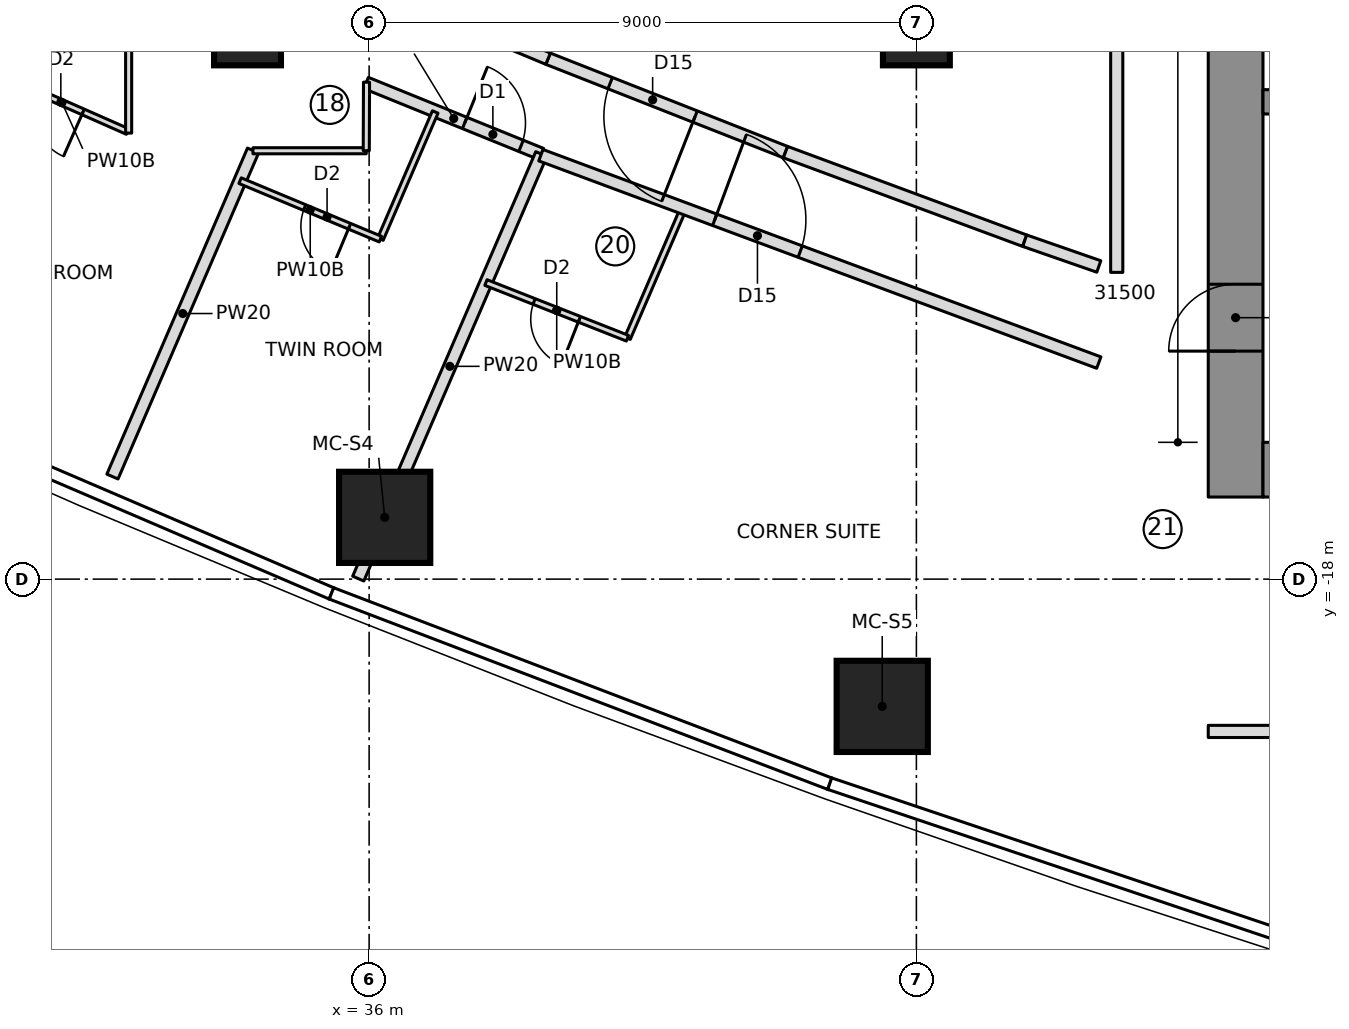
"""IFC4 building model, lengths in metres.
Left out: names, types, materials, properties, quantities, classifications, styles, units other than length and angle.
Written with IfcOpenShell. Run it as: python <this file> out.ifc"""

import sys

from ifc_helpers import new_model, si_unit, direction, frame, frame_2d, origin, origin_2d, place, context, subcontext, project, spatial, rectangle, extrude, element, fill, save


model = new_model("IFC4")
c1 = context("Model", 3, precision=1e-05, world=origin(), true_north=direction((0.0, 1.0)))
c2 = subcontext(c1, "Body", "Model", "MODEL_VIEW")
j1 = project(units=[si_unit("LENGTHUNIT", "METRE"), si_unit("PLANEANGLEUNIT", "RADIAN")], contexts=[c1])
p1 = place(None, origin())
s1 = spatial("IfcSite", under=j1, at=p1, CompositionType="ELEMENT")
p2 = place(p1, origin())
s2 = spatial("IfcBuilding", under=s1, at=p2, CompositionType="ELEMENT")
p3 = place(p2, frame((0.0, 0.0, 147.95)))
s3 = spatial("IfcBuildingStorey", under=s2, at=p3, CompositionType="ELEMENT", Elevation=147.95)
p4 = place(p3, frame((50.25, -16.65, 0.0), z_axis=(0.0, 0.0, 1.0), x_axis=(0.0, 1.0, 0.0)))
e1 = element("IfcWall", 1, at=p4, inside=s3, PredefinedType="SHEAR", context=c2, shape_type="SweptSolid", body=[
    extrude(rectangle(XDim=10.0, YDim=0.9, at=frame_2d((5.0, 0.0))), origin(), (0.0, 0.0, 1.0), 3.55),
])
p5 = place(p4, frame((2.4, 0.0, 0.0)))
e2 = element("IfcOpeningElement", 2, at=p5, cuts=e1, PredefinedType="OPENING", context=c2, shape_type="SweptSolid", body=[
    extrude(rectangle(XDim=1.1, YDim=2.1, at=frame_2d((0.55, 1.05))), frame((0.0, 0.46, 0.0), z_axis=(0.0, -1.0, 0.0), x_axis=(1.0, 0.0, 0.0)), (0.0, 0.0, 1.0), 0.92),
])
p6 = place(p3, frame((50.7, -16.2, 0.0), z_axis=(0.0, 0.0, 1.0), x_axis=(1.0, 0.0, 0.0)))
e3 = element("IfcWall", 3, at=p6, inside=s3, PredefinedType="SHEAR", context=c2, shape_type="SweptSolid", body=[
    extrude(rectangle(XDim=13.92, YDim=0.9, at=frame_2d((6.96, 0.0))), origin(), (0.0, 0.0, 1.0), 3.55),
])
p7 = place(p3, frame((50.7, -10.15, 0.0), z_axis=(0.0, 0.0, 1.0), x_axis=(1.0, 0.0, 0.0)))
e4 = element("IfcWall", 4, at=p7, inside=s3, PredefinedType="SHEAR", context=c2, shape_type="SweptSolid", body=[
    extrude(rectangle(XDim=13.02, YDim=0.4, at=frame_2d((6.51, 0.0))), origin(), (0.0, 0.0, 1.0), 3.55),
])
for number, where, z_axis, x_axis in (
    (5, (36.256, -16.984, 0.0), (0.0, 0.0, 1.0), (1.0, 0.0, 0.0)),
    (6, (44.438, -20.093, 0.0), (0.0, 0.0, 1.0), (1.0, 0.0, 0.0)),
):
    element("IfcColumn", number, at=place(p3, frame(where, z_axis=z_axis, x_axis=x_axis)), inside=s3, PredefinedType="COLUMN", context=c2, shape_type="SweptSolid", body=[
        extrude(rectangle(XDim=1.5, YDim=1.5, at=origin_2d()), origin(), (0.0, 0.0, 1.0), 3.55),
    ])
for number, where, z_axis, x_axis in (
    (7, (34.0, -9.0, 0.0), (0.0, 0.0, 1.0), (1.0, 0.0, 0.0)),
    (8, (45.0, -9.0, 0.0), (0.0, 0.0, 1.0), (1.0, 0.0, 0.0)),
):
    element("IfcColumn", number, at=place(p3, frame(where, z_axis=z_axis, x_axis=x_axis)), inside=s3, PredefinedType="COLUMN", context=c2, shape_type="SweptSolid", body=[
        extrude(rectangle(XDim=1.1, YDim=1.1, at=origin_2d()), origin(), (0.0, 0.0, 1.0), 3.55),
    ])
p8 = place(p3, frame((27.771, -14.554, 0.0), z_axis=(0.0, 0.0, 1.0), x_axis=(0.396004020147, 0.918248776763, 0.0)))
e9 = element("IfcWall", 9, at=p8, inside=s3, PredefinedType="PARTITIONING", context=c2, shape_type="SweptSolid", body=[
    extrude(rectangle(XDim=7.6, YDim=0.2, at=frame_2d((3.8, 0.0))), origin(), (0.0, 0.0, 1.0), 3.25),
])
p9 = place(p3, frame((32.028, -10.638, 0.0), z_axis=(0.0, 0.0, 1.0), x_axis=(-0.915108845766, 0.403206895278, 0.0)))
e10 = element("IfcWall", 10, at=p9, inside=s3, PredefinedType="PARTITIONING", context=c2, shape_type="SweptSolid", body=[
    extrude(rectangle(XDim=2.358, YDim=0.1, at=frame_2d((1.179, 0.0))), origin(), (0.0, 0.0, 1.0), 3.25),
])
p10 = place(p9, frame((0.8, 0.0, 0.0)))
e11 = element("IfcOpeningElement", 11, at=p10, cuts=e10, PredefinedType="OPENING", context=c2, shape_type="SweptSolid", body=[
    extrude(rectangle(XDim=0.8, YDim=2.1, at=frame_2d((0.4, 1.05))), frame((0.0, 0.06, 0.0), z_axis=(0.0, -1.0, 0.0), x_axis=(1.0, 0.0, 0.0)), (0.0, 0.0, 1.0), 0.12),
])
p11 = place(p3, frame((31.779, -16.313, 0.0), z_axis=(0.0, 0.0, 1.0), x_axis=(0.395991607501, 0.918254129742, 0.0)))
e12 = element("IfcWall", 12, at=p11, inside=s3, PredefinedType="PARTITIONING", context=c2, shape_type="SweptSolid", body=[
    extrude(rectangle(XDim=5.841, YDim=0.2, at=frame_2d((2.92, 0.0))), origin(), (0.0, 0.0, 1.0), 3.25),
])
p12 = place(p3, frame((35.95, -9.84, 0.0), z_axis=(0.0, 0.0, 1.0), x_axis=(0.926663171188, -0.375892760191, 0.0)))
e13 = element("IfcWall", 13, at=p12, inside=s3, PredefinedType="PARTITIONING", context=c2, shape_type="SweptSolid", body=[
    extrude(rectangle(XDim=3.11, YDim=0.2, at=frame_2d((1.555, 0.0))), origin(), (0.0, 0.0, 1.0), 3.25),
])
p13 = place(p12, frame((1.75, 0.0, 0.0)))
e14 = element("IfcOpeningElement", 14, at=p13, cuts=e13, PredefinedType="OPENING", context=c2, shape_type="SweptSolid", body=[
    extrude(rectangle(XDim=1.0, YDim=2.1, at=frame_2d((0.5, 1.05))), frame((0.0, 0.11, 0.0), z_axis=(0.0, -1.0, 0.0), x_axis=(1.0, 0.0, 0.0)), (0.0, 0.0, 1.0), 0.22),
])
p14 = place(p3, frame((37.087, -10.317, 0.0), z_axis=(0.0, 0.0, 1.0), x_axis=(-0.395936907069, -0.918277717045, 0.0)))
e15 = element("IfcWall", 15, at=p14, inside=s3, PredefinedType="PARTITIONING", context=c2, shape_type="SweptSolid", body=[
    extrude(rectangle(XDim=2.277, YDim=0.1, at=frame_2d((1.139, 0.0))), origin(), (0.0, 0.0, 1.0), 3.25),
])
p15 = place(p3, frame((36.185, -12.408, 0.0), z_axis=(0.0, 0.0, 1.0), x_axis=(-0.923033583854, 0.384719382248, 0.0)))
e16 = element("IfcWall", 16, at=p15, inside=s3, PredefinedType="PARTITIONING", context=c2, shape_type="SweptSolid", body=[
    extrude(rectangle(XDim=2.5, YDim=0.1, at=frame_2d((1.25, 0.0))), origin(), (0.0, 0.0, 1.0), 3.25),
])
p16 = place(p15, frame((0.55, 0.0, 0.0)))
e17 = element("IfcOpeningElement", 17, at=p16, cuts=e16, PredefinedType="OPENING", context=c2, shape_type="SweptSolid", body=[
    extrude(rectangle(XDim=0.8, YDim=2.1, at=frame_2d((0.4, 1.05))), frame((0.0, 0.06, 0.0), z_axis=(0.0, -1.0, 0.0), x_axis=(1.0, 0.0, 0.0)), (0.0, 0.0, 1.0), 0.12),
])
p17 = place(p3, frame((35.821, -17.991, 0.0), z_axis=(0.0, 0.0, 1.0), x_axis=(0.395987603644, 0.918255856371, 0.0)))
e18 = element("IfcWall", 18, at=p17, inside=s3, PredefinedType="PARTITIONING", context=c2, shape_type="SweptSolid", body=[
    extrude(rectangle(XDim=7.604, YDim=0.2, at=frame_2d((3.802, 0.0))), origin(), (0.0, 0.0, 1.0), 3.25),
])
p18 = place(p3, frame((41.151, -11.946, 0.0), z_axis=(0.0, 0.0, 1.0), x_axis=(-0.39596178423, -0.918266990275, 0.0)))
e19 = element("IfcWall", 19, at=p18, inside=s3, PredefinedType="PARTITIONING", context=c2, shape_type="SweptSolid", body=[
    extrude(rectangle(XDim=2.278, YDim=0.1, at=frame_2d((1.139, 0.0))), origin(), (0.0, 0.0, 1.0), 3.25),
])
p19 = place(p3, frame((40.249, -14.038, 0.0), z_axis=(0.0, 0.0, 1.0), x_axis=(-0.930555592459, 0.366150637503, 0.0)))
e20 = element("IfcWall", 20, at=p19, inside=s3, PredefinedType="PARTITIONING", context=c2, shape_type="SweptSolid", body=[
    extrude(rectangle(XDim=2.501, YDim=0.1, at=frame_2d((1.25, 0.0))), origin(), (0.0, 0.0, 1.0), 3.25),
])
p20 = place(p19, frame((0.85, 0.0, 0.0)))
e21 = element("IfcOpeningElement", 21, at=p20, cuts=e20, PredefinedType="OPENING", context=c2, shape_type="SweptSolid", body=[
    extrude(rectangle(XDim=0.8, YDim=2.1, at=frame_2d((0.4, 1.05))), frame((0.0, 0.06, 0.0), z_axis=(0.0, -1.0, 0.0), x_axis=(1.0, 0.0, 0.0)), (0.0, 0.0, 1.0), 0.12),
])
p21 = place(p3, frame((42.847, -10.977, 0.0), z_axis=(0.0, 0.0, 1.0), x_axis=(-0.930576677263, 0.36609704688, 0.0)))
e22 = element("IfcWall", 22, at=p21, inside=s3, PredefinedType="PARTITIONING", context=c2, shape_type="SweptSolid", body=[
    extrude(rectangle(XDim=4.195, YDim=0.2, at=frame_2d((2.098, 0.0))), origin(), (0.0, 0.0, 1.0), 3.25),
])
p22 = place(p21, frame((1.598, 0.0, 0.0)))
e23 = element("IfcOpeningElement", 23, at=p22, cuts=e22, PredefinedType="OPENING", context=c2, shape_type="SweptSolid", body=[
    extrude(rectangle(XDim=1.5, YDim=2.1, at=frame_2d((0.75, 1.05))), frame((0.0, 0.11, 0.0), z_axis=(0.0, -1.0, 0.0), x_axis=(1.0, 0.0, 0.0)), (0.0, 0.0, 1.0), 0.22),
])
p23 = place(p3, frame((46.781, -12.434, 0.0), z_axis=(0.0, 0.0, 1.0), x_axis=(-0.937732614305, 0.347357948044, 0.0)))
e24 = element("IfcWall", 24, at=p23, inside=s3, PredefinedType="PARTITIONING", context=c2, shape_type="SweptSolid", body=[
    extrude(rectangle(XDim=4.195, YDim=0.2, at=frame_2d((2.098, 0.0))), origin(), (0.0, 0.0, 1.0), 3.25),
])
p24 = place(p3, frame((38.943, -9.441, 0.0), z_axis=(0.0, 0.0, 1.0), x_axis=(-0.923008963065, 0.384778448073, 0.0)))
e25 = element("IfcWall", 25, at=p24, inside=s3, PredefinedType="PARTITIONING", context=c2, shape_type="SweptSolid", body=[
    extrude(rectangle(XDim=2.339, YDim=0.2, at=frame_2d((1.169, 0.0))), origin(), (0.0, 0.0, 1.0), 3.25),
])
p25 = place(p3, frame((49.8, -20.505, 0.0), z_axis=(0.0, 0.0, 1.0), x_axis=(1.0, 0.0, 0.0)))
e26 = element("IfcWall", 26, at=p25, inside=s3, PredefinedType="PARTITIONING", context=c2, shape_type="SweptSolid", body=[
    extrude(rectangle(XDim=12.133, YDim=0.2, at=frame_2d((6.066, 0.0))), origin(), (0.0, 0.0, 1.0), 3.25),
])
p26 = place(p25, frame((5.566, 0.0, 0.0)))
e27 = element("IfcOpeningElement", 27, at=p26, cuts=e26, PredefinedType="OPENING", context=c2, shape_type="SweptSolid", body=[
    extrude(rectangle(XDim=1.5, YDim=2.1, at=frame_2d((0.75, 1.05))), frame((0.0, 0.11, 0.0), z_axis=(0.0, -1.0, 0.0), x_axis=(1.0, 0.0, 0.0)), (0.0, 0.0, 1.0), 0.22),
])
p27 = place(p3, frame((32.045, -8.238, 0.0), z_axis=(0.0, 0.0, 1.0), x_axis=(0.0, -1.0, 0.0)))
e28 = element("IfcWall", 28, at=p27, inside=s3, PredefinedType="PARTITIONING", context=c2, shape_type="SweptSolid", body=[
    extrude(rectangle(XDim=2.426, YDim=0.1, at=frame_2d((1.213, 0.0))), origin(), (0.0, 0.0, 1.0), 3.25),
])
p28 = place(p3, frame((34.089, -10.955, 0.0), z_axis=(0.0, 0.0, 1.0), x_axis=(0.999999862691, 0.000524040279, 0.0)))
e29 = element("IfcWall", 29, at=p28, inside=s3, PredefinedType="PARTITIONING", context=c2, shape_type="SweptSolid", body=[
    extrude(rectangle(XDim=1.864, YDim=0.1, at=frame_2d((0.932, 0.0))), origin(), (0.0, 0.0, 1.0), 3.25),
])
p29 = place(p3, frame((35.953, -10.954, 0.0), z_axis=(0.0, 0.0, 1.0), x_axis=(0.00368122235, 0.999993224278, 0.0)))
e30 = element("IfcWall", 30, at=p29, inside=s3, PredefinedType="PARTITIONING", context=c2, shape_type="SweptSolid", body=[
    extrude(rectangle(XDim=1.127, YDim=0.1, at=frame_2d((0.564, 0.0))), origin(), (0.0, 0.0, 1.0), 3.25),
])
p30 = place(p3, frame((38.824, -11.028, 0.0), z_axis=(0.0, 0.0, 1.0), x_axis=(0.937322662166, -0.348462662262, 0.0)))
e31 = element("IfcWall", 31, at=p30, inside=s3, PredefinedType="PARTITIONING", context=c2, shape_type="SweptSolid", body=[
    extrude(rectangle(XDim=9.789, YDim=0.2, at=frame_2d((4.895, 0.0))), origin(), (0.0, 0.0, 1.0), 3.25),
])
p31 = place(p30, frame((3.05, 0.0, 0.0)))
e32 = element("IfcOpeningElement", 32, at=p31, cuts=e31, PredefinedType="OPENING", context=c2, shape_type="SweptSolid", body=[
    extrude(rectangle(XDim=1.5, YDim=2.1, at=frame_2d((0.75, 1.05))), frame((0.0, 0.11, 0.0), z_axis=(0.0, -1.0, 0.0), x_axis=(1.0, 0.0, 0.0)), (0.0, 0.0, 1.0), 0.22),
])
p32 = place(p3, frame((48.0, -12.858, 0.0), z_axis=(0.0, 0.0, 1.0), x_axis=(-0.944517215109, 0.328461916152, 0.0)))
e33 = element("IfcWall", 33, at=p32, inside=s3, PredefinedType="PARTITIONING", context=c2, shape_type="SweptSolid", body=[
    extrude(rectangle(XDim=1.29, YDim=0.2, at=frame_2d((0.645, 0.0))), origin(), (0.0, 0.0, 1.0), 3.25),
])
p33 = place(p3, frame((48.295, 12.955, 0.0), z_axis=(0.0, 0.0, 1.0), x_axis=(0.0, -1.0, 0.0)))
e34 = element("IfcWall", 34, at=p33, inside=s3, PredefinedType="PARTITIONING", context=c2, shape_type="SweptSolid", body=[
    extrude(rectangle(XDim=25.91, YDim=0.2, at=frame_2d((12.955, 0.0))), origin(), (0.0, 0.0, 1.0), 3.25),
])
p34 = place(p10, origin())
e35 = element("IfcDoor", 35, at=p34, inside=s3, OperationType="SINGLE_SWING_LEFT", PredefinedType="DOOR", context=c2, shape_type="SweptSolid", body=[
    extrude(rectangle(XDim=0.8, YDim=2.1, at=frame_2d((0.4, 1.05))), frame((0.0, 0.025, 0.0), z_axis=(0.0, -1.0, 0.0), x_axis=(1.0, 0.0, 0.0)), (0.0, 0.0, 1.0), 0.05),
])
fill(e11, e35)
p35 = place(p16, origin())
e36 = element("IfcDoor", 36, at=p35, inside=s3, OperationType="SINGLE_SWING_LEFT", PredefinedType="DOOR", context=c2, shape_type="SweptSolid", body=[
    extrude(rectangle(XDim=0.8, YDim=2.1, at=frame_2d((0.4, 1.05))), frame((0.0, 0.025, 0.0), z_axis=(0.0, -1.0, 0.0), x_axis=(1.0, 0.0, 0.0)), (0.0, 0.0, 1.0), 0.05),
])
fill(e17, e36)
p36 = place(p13, origin())
e37 = element("IfcDoor", 37, at=p36, inside=s3, OperationType="SINGLE_SWING_LEFT", PredefinedType="DOOR", context=c2, shape_type="SweptSolid", body=[
    extrude(rectangle(XDim=1.0, YDim=2.1, at=frame_2d((0.5, 1.05))), frame((0.0, 0.025, 0.0), z_axis=(0.0, -1.0, 0.0), x_axis=(1.0, 0.0, 0.0)), (0.0, 0.0, 1.0), 0.05),
])
fill(e14, e37)
p37 = place(p20, origin())
e38 = element("IfcDoor", 38, at=p37, inside=s3, OperationType="SINGLE_SWING_LEFT", PredefinedType="DOOR", context=c2, shape_type="SweptSolid", body=[
    extrude(rectangle(XDim=0.8, YDim=2.1, at=frame_2d((0.4, 1.05))), frame((0.0, 0.025, 0.0), z_axis=(0.0, -1.0, 0.0), x_axis=(1.0, 0.0, 0.0)), (0.0, 0.0, 1.0), 0.05),
])
fill(e21, e38)
p38 = place(p31, origin())
e39 = element("IfcDoor", 39, at=p38, inside=s3, OperationType="DOUBLE_DOOR_SINGLE_SWING", PredefinedType="DOOR", context=c2, shape_type="SweptSolid", body=[
    extrude(rectangle(XDim=1.5, YDim=2.1, at=frame_2d((0.75, 1.05))), frame((0.0, 0.025, 0.0), z_axis=(0.0, -1.0, 0.0), x_axis=(1.0, 0.0, 0.0)), (0.0, 0.0, 1.0), 0.05),
])
fill(e32, e39)
p39 = place(p22, origin())
e40 = element("IfcDoor", 40, at=p39, inside=s3, OperationType="DOUBLE_DOOR_SINGLE_SWING", PredefinedType="DOOR", context=c2, shape_type="SweptSolid", body=[
    extrude(rectangle(XDim=1.5, YDim=2.1, at=frame_2d((0.75, 1.05))), frame((0.0, 0.025, 0.0), z_axis=(0.0, -1.0, 0.0), x_axis=(1.0, 0.0, 0.0)), (0.0, 0.0, 1.0), 0.05),
])
fill(e23, e40)
p40 = place(p5, origin())
e41 = element("IfcDoor", 41, at=p40, inside=s3, OperationType="SINGLE_SWING_RIGHT", PredefinedType="DOOR", context=c2, shape_type="SweptSolid", body=[
    extrude(rectangle(XDim=1.1, YDim=2.1, at=frame_2d((0.55, 1.05))), frame((0.0, 0.025, 0.0), z_axis=(0.0, -1.0, 0.0), x_axis=(1.0, 0.0, 0.0)), (0.0, 0.0, 1.0), 0.05),
])
fill(e2, e41)
save(model, sys.argv[1])
